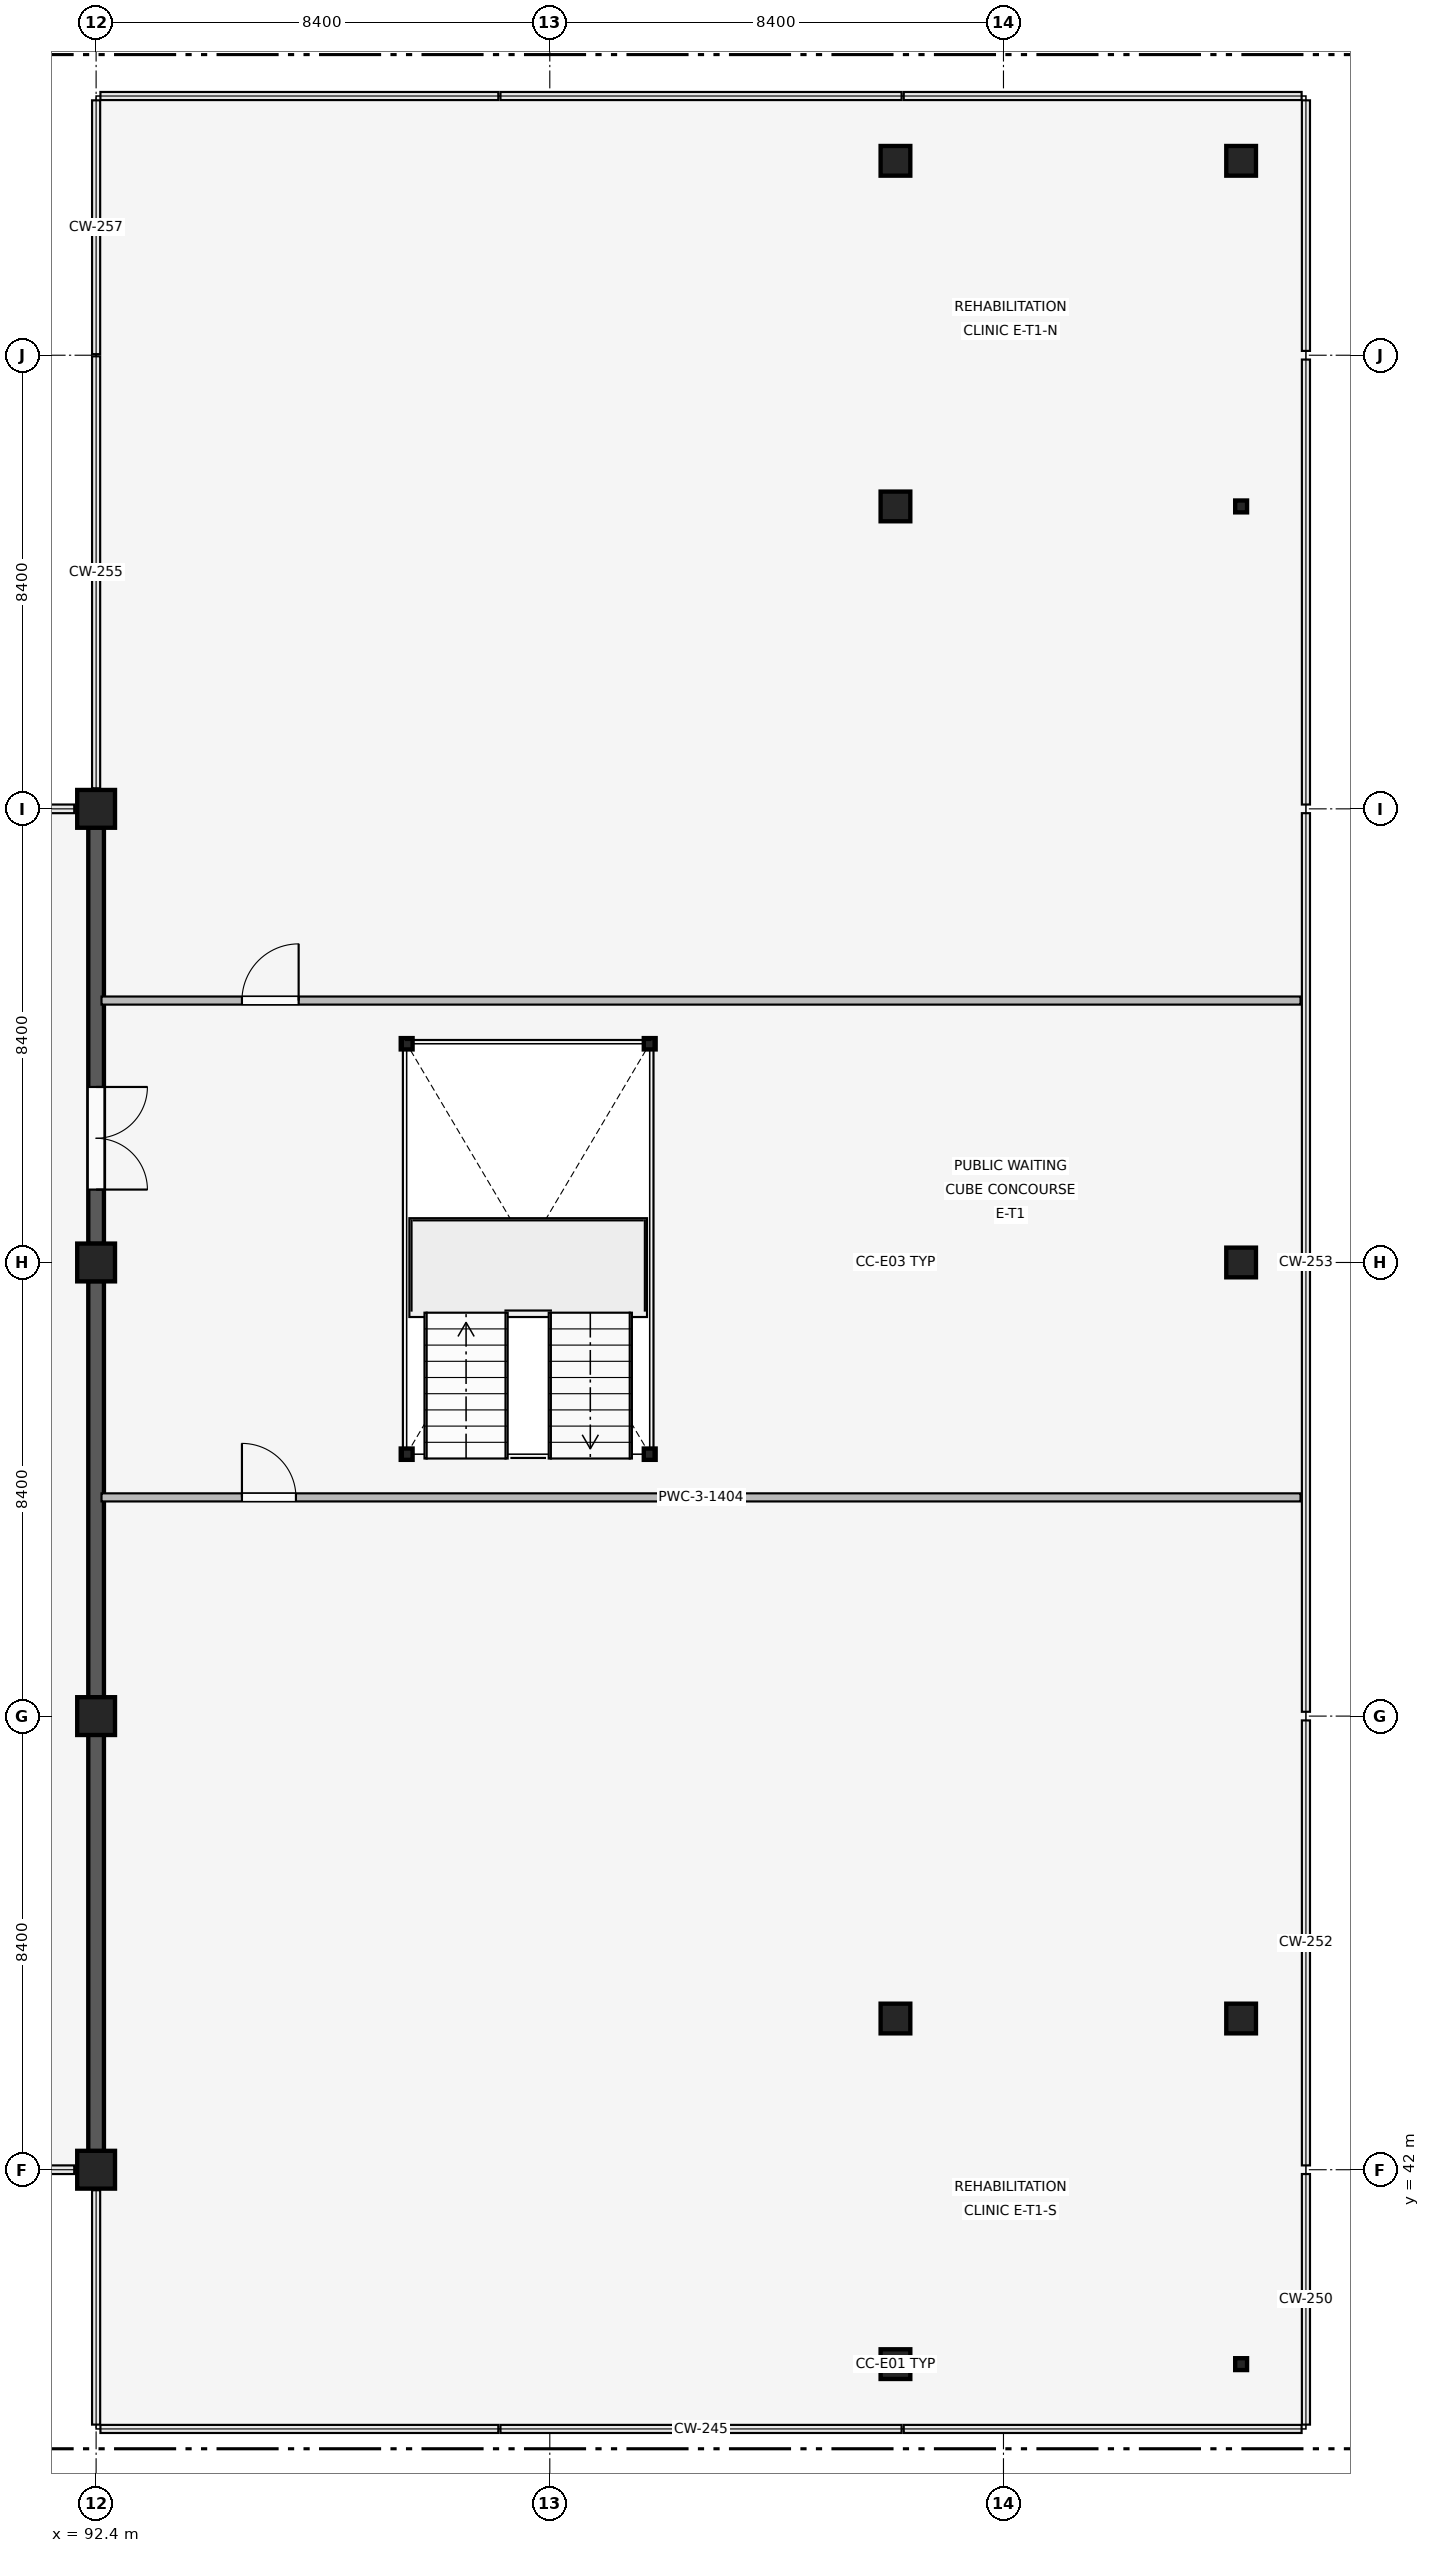
"""IFC4 building model, lengths in metres.
Left out: names, types, materials, properties, quantities, classifications, styles, units other than length and angle.
Written with IfcOpenShell. Run it as: python <this file> out.ifc"""

import sys

from ifc_helpers import new_model, si_unit, direction, frame, frame_2d, origin, origin_2d, place, context, subcontext, project, spatial, rectangle, i_section, extrude, element, fill, save


model = new_model("IFC4")
c1 = context("Model", 3, precision=1e-05, world=origin(), true_north=direction((0.0, 1.0)))
c2 = subcontext(c1, "Body", "Model", "MODEL_VIEW")
j1 = project(units=[si_unit("LENGTHUNIT", "METRE"), si_unit("PLANEANGLEUNIT", "RADIAN")], contexts=[c1])
p1 = place(None, origin())
s1 = spatial("IfcSite", under=j1, at=p1, CompositionType="ELEMENT")
p2 = place(p1, origin())
s2 = spatial("IfcBuilding", under=s1, at=p2, CompositionType="ELEMENT")
p3 = place(p2, frame((0.0, 0.0, 12.9)))
s3 = spatial("IfcBuildingStorey", under=s2, at=p3, CompositionType="ELEMENT", Elevation=12.9)
for number, where, z_axis, x_axis in (
    (1, (92.4, 42.0, 0.0), (0.0, 0.0, 1.0), (1.0, 0.0, 0.0)),
    (2, (92.4, 50.4, 0.0), (0.0, 0.0, 1.0), (1.0, 0.0, 0.0)),
    (3, (92.4, 58.8, 0.0), (0.0, 0.0, 1.0), (1.0, 0.0, 0.0)),
    (4, (92.4, 67.2, 0.0), (0.0, 0.0, 1.0), (1.0, 0.0, 0.0)),
):
    element("IfcColumn", number, at=place(p3, frame(where, z_axis=z_axis, x_axis=x_axis)), inside=s3, PredefinedType="COLUMN", context=c2, shape_type="SweptSolid", body=[
        extrude(rectangle(XDim=0.7, YDim=0.7, at=origin_2d()), origin(), (0.0, 0.0, 1.0), 3.3),
    ])
for number, where, z_axis, x_axis in (
    (5, (107.2, 38.4, 0.0), (0.0, 0.0, 1.0), (1.0, 0.0, 0.0)),
    (6, (107.2, 44.8, 0.0), (0.0, 0.0, 1.0), (1.0, 0.0, 0.0)),
):
    element("IfcColumn", number, at=place(p3, frame(where, z_axis=z_axis, x_axis=x_axis)), inside=s3, PredefinedType="COLUMN", context=c2, shape_type="SweptSolid", body=[
        extrude(rectangle(XDim=0.55, YDim=0.55, at=origin_2d()), origin(), (0.0, 0.0, 1.0), 3.3),
    ])
p4 = place(p3, frame((107.2, 58.8, 0.0), z_axis=(0.0, 0.0, 1.0), x_axis=(1.0, 0.0, 0.0)))
e7 = element("IfcColumn", 7, at=p4, inside=s3, PredefinedType="COLUMN", context=c2, shape_type="SweptSolid", body=[
    extrude(i_section(OverallWidth=0.22, OverallDepth=0.22, WebThickness=0.01, FlangeThickness=0.016, at=origin_2d()), origin(), (0.0, 0.0, 1.0), 3.3),
])
for number, where, z_axis, x_axis in (
    (8, (107.2, 72.8, 0.0), (0.0, 0.0, 1.0), (1.0, 0.0, 0.0)),
    (9, (107.2, 79.2, 0.0), (0.0, 0.0, 1.0), (1.0, 0.0, 0.0)),
):
    element("IfcColumn", number, at=place(p3, frame(where, z_axis=z_axis, x_axis=x_axis)), inside=s3, PredefinedType="COLUMN", context=c2, shape_type="SweptSolid", body=[
        extrude(rectangle(XDim=0.55, YDim=0.55, at=origin_2d()), origin(), (0.0, 0.0, 1.0), 3.3),
    ])
p5 = place(p3, frame((113.6, 38.4, 0.0), z_axis=(0.0, 0.0, 1.0), x_axis=(1.0, 0.0, 0.0)))
e10 = element("IfcColumn", 10, at=p5, inside=s3, PredefinedType="COLUMN", context=c2, shape_type="SweptSolid", body=[
    extrude(i_section(OverallWidth=0.22, OverallDepth=0.22, WebThickness=0.01, FlangeThickness=0.016, at=origin_2d()), origin(), (0.0, 0.0, 1.0), 3.3),
])
for number, where, z_axis, x_axis in (
    (11, (113.6, 44.8, 0.0), (0.0, 0.0, 1.0), (1.0, 0.0, 0.0)),
    (12, (113.6, 58.8, 0.0), (0.0, 0.0, 1.0), (1.0, 0.0, 0.0)),
):
    element("IfcColumn", number, at=place(p3, frame(where, z_axis=z_axis, x_axis=x_axis)), inside=s3, PredefinedType="COLUMN", context=c2, shape_type="SweptSolid", body=[
        extrude(rectangle(XDim=0.55, YDim=0.55, at=origin_2d()), origin(), (0.0, 0.0, 1.0), 3.3),
    ])
p6 = place(p3, frame((113.6, 72.8, 0.0), z_axis=(0.0, 0.0, 1.0), x_axis=(1.0, 0.0, 0.0)))
e13 = element("IfcColumn", 13, at=p6, inside=s3, PredefinedType="COLUMN", context=c2, shape_type="SweptSolid", body=[
    extrude(i_section(OverallWidth=0.22, OverallDepth=0.22, WebThickness=0.01, FlangeThickness=0.016, at=origin_2d()), origin(), (0.0, 0.0, 1.0), 3.3),
])
p7 = place(p3, frame((113.6, 79.2, 0.0), z_axis=(0.0, 0.0, 1.0), x_axis=(1.0, 0.0, 0.0)))
e14 = element("IfcColumn", 14, at=p7, inside=s3, PredefinedType="COLUMN", context=c2, shape_type="SweptSolid", body=[
    extrude(rectangle(XDim=0.55, YDim=0.55, at=origin_2d()), origin(), (0.0, 0.0, 1.0), 3.3),
])
for number, where, z_axis, x_axis in (
    (15, (98.15, 55.25, 0.0), (0.0, 0.0, 1.0), (1.0, 0.0, 0.0)),
    (16, (102.65, 55.25, 0.0), (0.0, 0.0, 1.0), (1.0, 0.0, 0.0)),
    (17, (98.15, 62.85, 0.0), (0.0, 0.0, 1.0), (1.0, 0.0, 0.0)),
    (18, (102.65, 62.85, 0.0), (0.0, 0.0, 1.0), (1.0, 0.0, 0.0)),
):
    element("IfcColumn", number, at=place(p3, frame(where, z_axis=z_axis, x_axis=x_axis)), inside=s3, PredefinedType="COLUMN", context=c2, shape_type="SweptSolid", body=[
        extrude(i_section(OverallWidth=0.22, OverallDepth=0.21, WebThickness=0.007, FlangeThickness=0.011, at=origin_2d()), origin(), (0.0, 0.0, 1.0), 3.3),
    ])
for number, where, z_axis, x_axis in (
    (19, (92.4, 50.055, 0.0), (0.0, 0.0, 1.0), (0.0, -1.0, 0.0)),
    (20, (92.4, 58.455, 0.0), (0.0, 0.0, 1.0), (0.0, -1.0, 0.0)),
):
    element("IfcWall", number, at=place(p3, frame(where, z_axis=z_axis, x_axis=x_axis)), inside=s3, PredefinedType="SOLIDWALL", context=c2, shape_type="SweptSolid", body=[
        extrude(rectangle(XDim=7.71, YDim=0.29, at=frame_2d((3.855, 0.0))), origin(), (0.0, 0.0, 1.0), 2.44),
    ])
p8 = place(p3, frame((92.4, 66.855, 0.0), z_axis=(0.0, 0.0, 1.0), x_axis=(0.0, -1.0, 0.0)))
e21 = element("IfcWall", 21, at=p8, inside=s3, PredefinedType="SOLIDWALL", context=c2, shape_type="SweptSolid", body=[
    extrude(rectangle(XDim=7.71, YDim=0.29, at=frame_2d((3.855, 0.0))), origin(), (0.0, 0.0, 1.0), 2.44),
])
p9 = place(p8, frame((4.805, 0.0, 0.0)))
e22 = element("IfcOpeningElement", 22, at=p9, cuts=e21, PredefinedType="OPENING", context=c2, shape_type="SweptSolid", body=[
    extrude(rectangle(XDim=1.9, YDim=2.34, at=frame_2d((0.95, 1.17))), frame((0.0, 0.155, 0.0), z_axis=(0.0, -1.0, 0.0), x_axis=(1.0, 0.0, 0.0)), (0.0, 0.0, 1.0), 0.31),
])
p10 = place(p3, frame((92.5, 54.45, 0.0), z_axis=(0.0, 0.0, 1.0), x_axis=(1.0, 0.0, 0.0)))
e23 = element("IfcWall", 23, at=p10, inside=s3, PredefinedType="PARTITIONING", context=c2, shape_type="SweptSolid", body=[
    extrude(rectangle(XDim=22.2, YDim=0.15, at=frame_2d((11.1, 0.0))), origin(), (0.0, 0.0, 1.0), 2.59),
])
p11 = place(p10, frame((2.6, 0.0, 0.0)))
e24 = element("IfcOpeningElement", 24, at=p11, cuts=e23, PredefinedType="OPENING", context=c2, shape_type="SweptSolid", body=[
    extrude(rectangle(XDim=1.0, YDim=2.15, at=frame_2d((0.5, 1.075))), frame((0.0, 0.085, 0.0), z_axis=(0.0, -1.0, 0.0), x_axis=(1.0, 0.0, 0.0)), (0.0, 0.0, 1.0), 0.17),
])
p12 = place(p3, frame((92.5, 63.65, 0.0), z_axis=(0.0, 0.0, 1.0), x_axis=(1.0, 0.0, 0.0)))
e25 = element("IfcWall", 25, at=p12, inside=s3, PredefinedType="PARTITIONING", context=c2, shape_type="SweptSolid", body=[
    extrude(rectangle(XDim=22.2, YDim=0.15, at=frame_2d((11.1, 0.0))), origin(), (0.0, 0.0, 1.0), 2.59),
])
p13 = place(p12, frame((2.6, 0.0, 0.0)))
e26 = element("IfcOpeningElement", 26, at=p13, cuts=e25, PredefinedType="OPENING", context=c2, shape_type="SweptSolid", body=[
    extrude(rectangle(XDim=1.05, YDim=2.2, at=frame_2d((0.525, 1.1))), frame((0.0, 0.085, 0.0), z_axis=(0.0, -1.0, 0.0), x_axis=(1.0, 0.0, 0.0)), (0.0, 0.0, 1.0), 0.17),
])
p14 = place(p9, origin())
e27 = element("IfcDoor", 27, at=p14, inside=s3, OperationType="DOUBLE_SWING_LEFT", PredefinedType="DOOR", context=c2, shape_type="SweptSolid", body=[
    extrude(rectangle(XDim=1.9, YDim=2.34, at=frame_2d((0.95, 1.17))), frame((0.0, 0.025, 0.0), z_axis=(0.0, -1.0, 0.0), x_axis=(1.0, 0.0, 0.0)), (0.0, 0.0, 1.0), 0.05),
])
fill(e22, e27)
p15 = place(p11, origin())
e28 = element("IfcDoor", 28, at=p15, inside=s3, OperationType="SINGLE_SWING_LEFT", PredefinedType="DOOR", context=c2, shape_type="SweptSolid", body=[
    extrude(rectangle(XDim=1.0, YDim=2.15, at=frame_2d((0.5, 1.075))), frame((0.0, 0.025, 0.0), z_axis=(0.0, -1.0, 0.0), x_axis=(1.0, 0.0, 0.0)), (0.0, 0.0, 1.0), 0.05),
])
fill(e24, e28)
p16 = place(p13, origin())
e29 = element("IfcDoor", 29, at=p16, inside=s3, OperationType="SINGLE_SWING_RIGHT", PredefinedType="DOOR", context=c2, shape_type="SweptSolid", body=[
    extrude(rectangle(XDim=1.05, YDim=2.2, at=frame_2d((0.525, 1.1))), frame((0.0, 0.025, 0.0), z_axis=(0.0, -1.0, 0.0), x_axis=(1.0, 0.0, 0.0)), (0.0, 0.0, 1.0), 0.05),
])
fill(e26, e29)
save(model, sys.argv[1])
